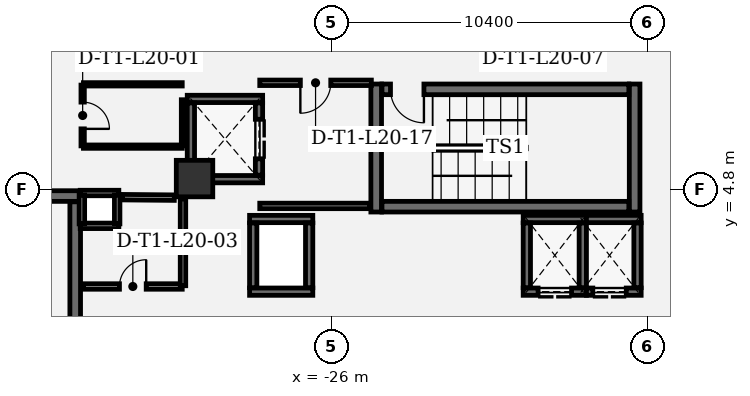
"""IFC4 building model, lengths in metres.
Left out: names, types, materials, properties, quantities, classifications, styles, units other than length and angle.
Written with IfcOpenShell. Run it as: python <this file> out.ifc"""

import sys

from ifc_helpers import new_model, si_unit, direction, frame, frame_2d, origin, origin_2d, place, context, subcontext, project, spatial, rectangle, extrude, element, fill, save


model = new_model("IFC4")
c1 = context("Model", 3, precision=1e-05, world=origin(), true_north=direction((0.0, 1.0)))
c2 = subcontext(c1, "Body", "Model", "MODEL_VIEW")
j1 = project(units=[si_unit("LENGTHUNIT", "METRE"), si_unit("PLANEANGLEUNIT", "RADIAN")], contexts=[c1])
p1 = place(None, origin())
s1 = spatial("IfcSite", under=j1, at=p1, CompositionType="ELEMENT")
p2 = place(p1, origin())
s2 = spatial("IfcBuilding", under=s1, at=p2, CompositionType="ELEMENT")
p3 = place(p2, frame((0.0, 0.0, 91.2)))
s3 = spatial("IfcBuildingStorey", under=s2, at=p3, CompositionType="ELEMENT", Elevation=91.2)
p4 = place(p3, frame((-30.5, 5.15, 0.0), z_axis=(0.0, 0.0, 1.0), x_axis=(1.0, 0.0, 0.0)))
e1 = element("IfcColumn", 1, at=p4, inside=s3, PredefinedType="COLUMN", context=c2, shape_type="SweptSolid", body=[
    extrude(rectangle(XDim=1.2, YDim=1.2, at=origin_2d()), origin(), (0.0, 0.0, 1.0), 4.2),
])
for number, where, z_axis, x_axis in (
    (2, (-24.525, 8.26, 0.0), (0.0, 0.0, 1.0), (0.0, -1.0, 0.0)),
    (3, (-16.025, 4.05, 0.0), (0.0, 0.0, 1.0), (0.0, 1.0, 0.0)),
):
    element("IfcWall", number, at=place(p3, frame(where, z_axis=z_axis, x_axis=x_axis)), inside=s3, PredefinedType="SHEAR", context=c2, shape_type="SweptSolid", body=[
        extrude(rectangle(XDim=4.21, YDim=0.35, at=frame_2d((2.105, 0.0))), origin(), (0.0, 0.0, 1.0), 3.92),
    ])
p5 = place(p3, frame((-24.335, 4.225, 0.0), z_axis=(0.0, 0.0, 1.0), x_axis=(1.0, 0.0, 0.0)))
e4 = element("IfcWall", 4, at=p5, inside=s3, PredefinedType="SHEAR", context=c2, shape_type="SweptSolid", body=[
    extrude(rectangle(XDim=8.12, YDim=0.35, at=frame_2d((4.06, 0.0))), origin(), (0.0, 0.0, 1.0), 3.92),
])
p6 = place(p3, frame((-16.215, 8.085, 0.0), z_axis=(0.0, 0.0, 1.0), x_axis=(-1.0, 0.0, 0.0)))
e5 = element("IfcWall", 5, at=p6, inside=s3, PredefinedType="SHEAR", context=c2, shape_type="SweptSolid", body=[
    extrude(rectangle(XDim=8.12, YDim=0.35, at=frame_2d((4.06, 0.0))), origin(), (0.0, 0.0, 1.0), 3.92),
])
p7 = place(p6, frame((6.74, 0.0, 0.0)))
e6 = element("IfcOpeningElement", 6, at=p7, cuts=e5, PredefinedType="OPENING", context=c2, shape_type="SweptSolid", body=[
    extrude(rectangle(XDim=1.1, YDim=2.2, at=frame_2d((0.55, 1.1))), frame((0.0, 0.185, 0.0), z_axis=(0.0, -1.0, 0.0), x_axis=(1.0, 0.0, 0.0)), (0.0, 0.0, 1.0), 0.37),
])
p8 = place(p3, frame((-34.25, 4.575, 0.0), z_axis=(0.0, 0.0, 1.0), x_axis=(-1.0, 0.0, 0.0)))
e7 = element("IfcWall", 7, at=p8, inside=s3, PredefinedType="SHEAR", context=c2, shape_type="SweptSolid", body=[
    extrude(rectangle(XDim=4.21, YDim=0.35, at=frame_2d((2.105, 0.0))), origin(), (0.0, 0.0, 1.0), 3.92),
])
p9 = place(p3, frame((-34.425, -4.385, 0.0), z_axis=(0.0, 0.0, 1.0), x_axis=(0.0, 1.0, 0.0)))
e8 = element("IfcWall", 8, at=p9, inside=s3, PredefinedType="SHEAR", context=c2, shape_type="SweptSolid", body=[
    extrude(rectangle(XDim=8.77, YDim=0.35, at=frame_2d((4.385, 0.0))), origin(), (0.0, 0.0, 1.0), 3.92),
])
for number, where, z_axis, x_axis in (
    (9, (-28.26, 5.13, 0.0), (0.0, 0.0, 1.0), (-1.0, 0.0, 0.0)),
    (10, (-30.74, 7.77, 0.0), (0.0, 0.0, 1.0), (1.0, 0.0, 0.0)),
):
    element("IfcWall", number, at=place(p3, frame(where, z_axis=z_axis, x_axis=x_axis)), inside=s3, PredefinedType="SHEAR", context=c2, shape_type="SweptSolid", body=[
        extrude(rectangle(XDim=2.48, YDim=0.24, at=frame_2d((1.24, 0.0))), origin(), (0.0, 0.0, 1.0), 3.92),
    ])
p10 = place(p3, frame((-30.62, 5.262, 0.0), z_axis=(0.0, 0.0, 1.0), x_axis=(0.0, 1.0, 0.0)))
e11 = element("IfcWall", 11, at=p10, inside=s3, PredefinedType="SHEAR", context=c2, shape_type="SweptSolid", body=[
    extrude(rectangle(XDim=2.376, YDim=0.24, at=frame_2d((1.188, 0.0))), origin(), (0.0, 0.0, 1.0), 3.92),
])
p11 = place(p3, frame((-28.38, 7.638, 0.0), z_axis=(0.0, 0.0, 1.0), x_axis=(0.0, -1.0, 0.0)))
e12 = element("IfcWall", 12, at=p11, inside=s3, PredefinedType="SHEAR", context=c2, shape_type="SweptSolid", body=[
    extrude(rectangle(XDim=2.376, YDim=0.24, at=frame_2d((1.188, 0.0))), origin(), (0.0, 0.0, 1.0), 3.92),
])
p12 = place(p11, frame((0.538, 0.0, 0.0)))
e13 = element("IfcOpeningElement", 13, at=p12, cuts=e12, PredefinedType="OPENING", context=c2, shape_type="SweptSolid", body=[
    extrude(rectangle(XDim=1.3, YDim=2.3, at=frame_2d((0.65, 1.15))), frame((0.0, 0.13, 0.0), z_axis=(0.0, -1.0, 0.0), x_axis=(1.0, 0.0, 0.0)), (0.0, 0.0, 1.0), 0.26),
])
for number, where, z_axis, x_axis in (
    (14, (-26.61, 1.43, 0.0), (0.0, 0.0, 1.0), (-1.0, 0.0, 0.0)),
    (15, (-28.69, 3.82, 0.0), (0.0, 0.0, 1.0), (1.0, 0.0, 0.0)),
):
    element("IfcWall", number, at=place(p3, frame(where, z_axis=z_axis, x_axis=x_axis)), inside=s3, PredefinedType="SHEAR", context=c2, shape_type="SweptSolid", body=[
        extrude(rectangle(XDim=2.08, YDim=0.24, at=frame_2d((1.04, 0.0))), origin(), (0.0, 0.0, 1.0), 3.92),
    ])
for number, where, z_axis, x_axis in (
    (16, (-28.57, 1.562, 0.0), (0.0, 0.0, 1.0), (0.0, 1.0, 0.0)),
    (17, (-26.73, 3.688, 0.0), (0.0, 0.0, 1.0), (0.0, -1.0, 0.0)),
):
    element("IfcWall", number, at=place(p3, frame(where, z_axis=z_axis, x_axis=x_axis)), inside=s3, PredefinedType="SHEAR", context=c2, shape_type="SweptSolid", body=[
        extrude(rectangle(XDim=2.126, YDim=0.24, at=frame_2d((1.063, 0.0))), origin(), (0.0, 0.0, 1.0), 3.92),
    ])
p13 = place(p3, frame((-17.61, 1.43, 0.0), z_axis=(0.0, 0.0, 1.0), x_axis=(-1.0, 0.0, 0.0)))
e18 = element("IfcWall", 18, at=p13, inside=s3, PredefinedType="SHEAR", context=c2, shape_type="SweptSolid", body=[
    extrude(rectangle(XDim=2.08, YDim=0.24, at=frame_2d((1.04, 0.0))), origin(), (0.0, 0.0, 1.0), 3.92),
])
p14 = place(p13, frame((0.49, 0.0, 0.0)))
e19 = element("IfcOpeningElement", 19, at=p14, cuts=e18, PredefinedType="OPENING", context=c2, shape_type="SweptSolid", body=[
    extrude(rectangle(XDim=1.1, YDim=2.2, at=frame_2d((0.55, 1.1))), frame((0.0, 0.13, 0.0), z_axis=(0.0, -1.0, 0.0), x_axis=(1.0, 0.0, 0.0)), (0.0, 0.0, 1.0), 0.26),
])
p15 = place(p3, frame((-19.69, 3.82, 0.0), z_axis=(0.0, 0.0, 1.0), x_axis=(1.0, 0.0, 0.0)))
e20 = element("IfcWall", 20, at=p15, inside=s3, PredefinedType="SHEAR", context=c2, shape_type="SweptSolid", body=[
    extrude(rectangle(XDim=2.08, YDim=0.24, at=frame_2d((1.04, 0.0))), origin(), (0.0, 0.0, 1.0), 3.92),
])
for number, where, z_axis, x_axis in (
    (21, (-19.57, 1.562, 0.0), (0.0, 0.0, 1.0), (0.0, 1.0, 0.0)),
    (22, (-17.73, 3.688, 0.0), (0.0, 0.0, 1.0), (0.0, -1.0, 0.0)),
):
    element("IfcWall", number, at=place(p3, frame(where, z_axis=z_axis, x_axis=x_axis)), inside=s3, PredefinedType="SHEAR", context=c2, shape_type="SweptSolid", body=[
        extrude(rectangle(XDim=2.126, YDim=0.24, at=frame_2d((1.063, 0.0))), origin(), (0.0, 0.0, 1.0), 3.92),
    ])
p16 = place(p3, frame((-15.81, 1.43, 0.0), z_axis=(0.0, 0.0, 1.0), x_axis=(-1.0, 0.0, 0.0)))
e23 = element("IfcWall", 23, at=p16, inside=s3, PredefinedType="SHEAR", context=c2, shape_type="SweptSolid", body=[
    extrude(rectangle(XDim=1.8, YDim=0.24, at=frame_2d((0.9, 0.0))), origin(), (0.0, 0.0, 1.0), 3.92),
])
p17 = place(p16, frame((0.49, 0.0, 0.0)))
e24 = element("IfcOpeningElement", 24, at=p17, cuts=e23, PredefinedType="OPENING", context=c2, shape_type="SweptSolid", body=[
    extrude(rectangle(XDim=1.1, YDim=2.2, at=frame_2d((0.55, 1.1))), frame((0.0, 0.13, 0.0), z_axis=(0.0, -1.0, 0.0), x_axis=(1.0, 0.0, 0.0)), (0.0, 0.0, 1.0), 0.26),
])
p18 = place(p3, frame((-17.61, 3.82, 0.0), z_axis=(0.0, 0.0, 1.0), x_axis=(1.0, 0.0, 0.0)))
e25 = element("IfcWall", 25, at=p18, inside=s3, PredefinedType="SHEAR", context=c2, shape_type="SweptSolid", body=[
    extrude(rectangle(XDim=1.8, YDim=0.24, at=frame_2d((0.9, 0.0))), origin(), (0.0, 0.0, 1.0), 3.92),
])
p19 = place(p3, frame((-15.93, 3.688, 0.0), z_axis=(0.0, 0.0, 1.0), x_axis=(0.0, -1.0, 0.0)))
e26 = element("IfcWall", 26, at=p19, inside=s3, PredefinedType="SHEAR", context=c2, shape_type="SweptSolid", body=[
    extrude(rectangle(XDim=2.126, YDim=0.24, at=frame_2d((1.063, 0.0))), origin(), (0.0, 0.0, 1.0), 3.92),
])
for number, where, z_axis, x_axis in (
    (27, (-32.99, 3.595, 0.0), (0.0, 0.0, 1.0), (-1.0, 0.0, 0.0)),
    (28, (-34.26, 4.675, 0.0), (0.0, 0.0, 1.0), (1.0, 0.0, 0.0)),
):
    element("IfcWall", number, at=place(p3, frame(where, z_axis=z_axis, x_axis=x_axis)), inside=s3, PredefinedType="PARTITIONING", context=c2, shape_type="SweptSolid", body=[
        extrude(rectangle(XDim=1.27, YDim=0.18, at=frame_2d((0.635, 0.0))), origin(), (0.0, 0.0, 1.0), 3.92),
    ])
for number, where, z_axis, x_axis in (
    (29, (-34.205, 3.66, 0.0), (0.0, 0.0, 1.0), (0.0, 1.0, 0.0)),
    (30, (-33.045, 4.61, 0.0), (0.0, 0.0, 1.0), (0.0, -1.0, 0.0)),
):
    element("IfcWall", number, at=place(p3, frame(where, z_axis=z_axis, x_axis=x_axis)), inside=s3, PredefinedType="PARTITIONING", context=c2, shape_type="SweptSolid", body=[
        extrude(rectangle(XDim=0.95, YDim=0.18, at=frame_2d((0.475, 0.0))), origin(), (0.0, 0.0, 1.0), 3.92),
    ])
p20 = place(p3, frame((-28.355, 4.25, 0.0), z_axis=(0.0, 0.0, 1.0), x_axis=(1.0, 0.0, 0.0)))
e31 = element("IfcWall", 31, at=p20, inside=s3, PredefinedType="PARTITIONING", context=c2, shape_type="SweptSolid", body=[
    extrude(rectangle(XDim=3.622, YDim=0.18, at=frame_2d((1.811, 0.0))), origin(), (0.0, 0.0, 1.0), 3.92),
])
p21 = place(p3, frame((-24.684, 8.3, 0.0), z_axis=(0.0, 0.0, 1.0), x_axis=(-1.0, 0.0, 0.0)))
e32 = element("IfcWall", 32, at=p21, inside=s3, PredefinedType="PARTITIONING", context=c2, shape_type="SweptSolid", body=[
    extrude(rectangle(XDim=3.671, YDim=0.18, at=frame_2d((1.835, 0.0))), origin(), (0.0, 0.0, 1.0), 3.92),
])
p22 = place(p21, frame((1.335, 0.0, 0.0)))
e33 = element("IfcOpeningElement", 33, at=p22, cuts=e32, PredefinedType="OPENING", context=c2, shape_type="SweptSolid", body=[
    extrude(rectangle(XDim=1.0, YDim=2.15, at=frame_2d((0.5, 1.075))), frame((0.0, 0.1, 0.0), z_axis=(0.0, -1.0, 0.0), x_axis=(1.0, 0.0, 0.0)), (0.0, 0.0, 1.0), 0.2),
])
p23 = place(p3, frame((-34.18, 8.225, 0.0), z_axis=(0.0, 0.0, 1.0), x_axis=(0.0, -1.0, 0.0)))
e34 = element("IfcWall", 34, at=p23, inside=s3, PredefinedType="PARTITIONING", context=c2, shape_type="SweptSolid", body=[
    extrude(rectangle(XDim=2.0, YDim=0.11, at=frame_2d((1.0, 0.0))), origin(), (0.0, 0.0, 1.0), 3.92),
])
p24 = place(p23, frame((0.56, 0.0, 0.0)))
e35 = element("IfcOpeningElement", 35, at=p24, cuts=e34, PredefinedType="OPENING", context=c2, shape_type="SweptSolid", body=[
    extrude(rectangle(XDim=0.88, YDim=2.1, at=frame_2d((0.44, 1.05))), frame((0.0, 0.065, 0.0), z_axis=(0.0, -1.0, 0.0), x_axis=(1.0, 0.0, 0.0)), (0.0, 0.0, 1.0), 0.13),
])
p25 = place(p3, frame((-34.155, 6.2, 0.0), z_axis=(0.0, 0.0, 1.0), x_axis=(1.0, 0.0, 0.0)))
e36 = element("IfcWall", 36, at=p25, inside=s3, PredefinedType="PARTITIONING", context=c2, shape_type="SweptSolid", body=[
    extrude(rectangle(XDim=3.25, YDim=0.11, at=frame_2d((1.625, 0.0))), origin(), (0.0, 0.0, 1.0), 3.433),
])
p26 = place(p3, frame((-30.88, 6.225, 0.0), z_axis=(0.0, 0.0, 1.0), x_axis=(0.0, 1.0, 0.0)))
e37 = element("IfcWall", 37, at=p26, inside=s3, PredefinedType="PARTITIONING", context=c2, shape_type="SweptSolid", body=[
    extrude(rectangle(XDim=1.518, YDim=0.11, at=frame_2d((0.759, 0.0))), origin(), (0.0, 0.0, 1.0), 3.92),
])
p27 = place(p3, frame((-30.905, 8.25, 0.0), z_axis=(0.0, 0.0, 1.0), x_axis=(-1.0, 0.0, 0.0)))
e38 = element("IfcWall", 38, at=p27, inside=s3, PredefinedType="PARTITIONING", context=c2, shape_type="SweptSolid", body=[
    extrude(rectangle(XDim=3.25, YDim=0.11, at=frame_2d((1.625, 0.0))), origin(), (0.0, 0.0, 1.0), 3.92),
])
p28 = place(p3, frame((-34.155, 1.6, 0.0), z_axis=(0.0, 0.0, 1.0), x_axis=(1.0, 0.0, 0.0)))
e39 = element("IfcWall", 39, at=p28, inside=s3, PredefinedType="PARTITIONING", context=c2, shape_type="SweptSolid", body=[
    extrude(rectangle(XDim=3.25, YDim=0.18, at=frame_2d((1.625, 0.0))), origin(), (0.0, 0.0, 1.0), 3.92),
])
p29 = place(p28, frame((1.185, 0.0, 0.0)))
e40 = element("IfcOpeningElement", 40, at=p29, cuts=e39, PredefinedType="OPENING", context=c2, shape_type="SweptSolid", body=[
    extrude(rectangle(XDim=0.88, YDim=2.1, at=frame_2d((0.44, 1.05))), frame((0.0, 0.1, 0.0), z_axis=(0.0, -1.0, 0.0), x_axis=(1.0, 0.0, 0.0)), (0.0, 0.0, 1.0), 0.2),
])
p30 = place(p3, frame((-30.88, 1.625, 0.0), z_axis=(0.0, 0.0, 1.0), x_axis=(0.0, 1.0, 0.0)))
e41 = element("IfcWall", 41, at=p30, inside=s3, PredefinedType="PARTITIONING", context=c2, shape_type="SweptSolid", body=[
    extrude(rectangle(XDim=2.86, YDim=0.18, at=frame_2d((1.43, 0.0))), origin(), (0.0, 0.0, 1.0), 3.92),
])
p31 = place(p3, frame((-31.165, 4.522, 0.0), z_axis=(0.0, 0.0, 1.0), x_axis=(-0.9999584918, 0.009111239105, 0.0)))
e42 = element("IfcWall", 42, at=p31, inside=s3, PredefinedType="PARTITIONING", context=c2, shape_type="SweptSolid", body=[
    extrude(rectangle(XDim=1.715, YDim=0.18, at=frame_2d((0.857, 0.0))), origin(), (0.0, 0.0, 1.0), 3.92),
])
p32 = place(p7, origin())
e43 = element("IfcDoor", 43, at=p32, inside=s3, OperationType="SINGLE_SWING_LEFT", PredefinedType="DOOR", context=c2, shape_type="SweptSolid", body=[
    extrude(rectangle(XDim=1.1, YDim=2.2, at=frame_2d((0.55, 1.1))), frame((0.0, 0.025, 0.0), z_axis=(0.0, -1.0, 0.0), x_axis=(1.0, 0.0, 0.0)), (0.0, 0.0, 1.0), 0.05),
])
fill(e6, e43)
p33 = place(p12, origin())
e44 = element("IfcDoor", 44, at=p33, inside=s3, OperationType="DOUBLE_DOOR_SLIDING", PredefinedType="DOOR", context=c2, shape_type="SweptSolid", body=[
    extrude(rectangle(XDim=1.3, YDim=2.3, at=frame_2d((0.65, 1.15))), frame((0.0, 0.025, 0.0), z_axis=(0.0, -1.0, 0.0), x_axis=(1.0, 0.0, 0.0)), (0.0, 0.0, 1.0), 0.05),
])
fill(e13, e44)
p34 = place(p14, origin())
e45 = element("IfcDoor", 45, at=p34, inside=s3, OperationType="DOUBLE_DOOR_SLIDING", PredefinedType="DOOR", context=c2, shape_type="SweptSolid", body=[
    extrude(rectangle(XDim=1.1, YDim=2.2, at=frame_2d((0.55, 1.1))), frame((0.0, 0.025, 0.0), z_axis=(0.0, -1.0, 0.0), x_axis=(1.0, 0.0, 0.0)), (0.0, 0.0, 1.0), 0.05),
])
fill(e19, e45)
p35 = place(p17, origin())
e46 = element("IfcDoor", 46, at=p35, inside=s3, OperationType="DOUBLE_DOOR_SLIDING", PredefinedType="DOOR", context=c2, shape_type="SweptSolid", body=[
    extrude(rectangle(XDim=1.1, YDim=2.2, at=frame_2d((0.55, 1.1))), frame((0.0, 0.025, 0.0), z_axis=(0.0, -1.0, 0.0), x_axis=(1.0, 0.0, 0.0)), (0.0, 0.0, 1.0), 0.05),
])
fill(e24, e46)
p36 = place(p24, origin())
e47 = element("IfcDoor", 47, at=p36, inside=s3, OperationType="SINGLE_SWING_RIGHT", PredefinedType="DOOR", context=c2, shape_type="SweptSolid", body=[
    extrude(rectangle(XDim=0.88, YDim=2.1, at=frame_2d((0.44, 1.05))), frame((0.0, 0.025, 0.0), z_axis=(0.0, -1.0, 0.0), x_axis=(1.0, 0.0, 0.0)), (0.0, 0.0, 1.0), 0.05),
])
fill(e35, e47)
p37 = place(p29, origin())
e48 = element("IfcDoor", 48, at=p37, inside=s3, OperationType="SINGLE_SWING_RIGHT", PredefinedType="DOOR", context=c2, shape_type="SweptSolid", body=[
    extrude(rectangle(XDim=0.88, YDim=2.1, at=frame_2d((0.44, 1.05))), frame((0.0, 0.025, 0.0), z_axis=(0.0, -1.0, 0.0), x_axis=(1.0, 0.0, 0.0)), (0.0, 0.0, 1.0), 0.05),
])
fill(e40, e48)
p38 = place(p22, origin())
e49 = element("IfcDoor", 49, at=p38, inside=s3, OperationType="SINGLE_SWING_RIGHT", PredefinedType="DOOR", context=c2, shape_type="SweptSolid", body=[
    extrude(rectangle(XDim=1.0, YDim=2.15, at=frame_2d((0.5, 1.075))), frame((0.0, 0.025, 0.0), z_axis=(0.0, -1.0, 0.0), x_axis=(1.0, 0.0, 0.0)), (0.0, 0.0, 1.0), 0.05),
])
fill(e33, e49)
save(model, sys.argv[1])
